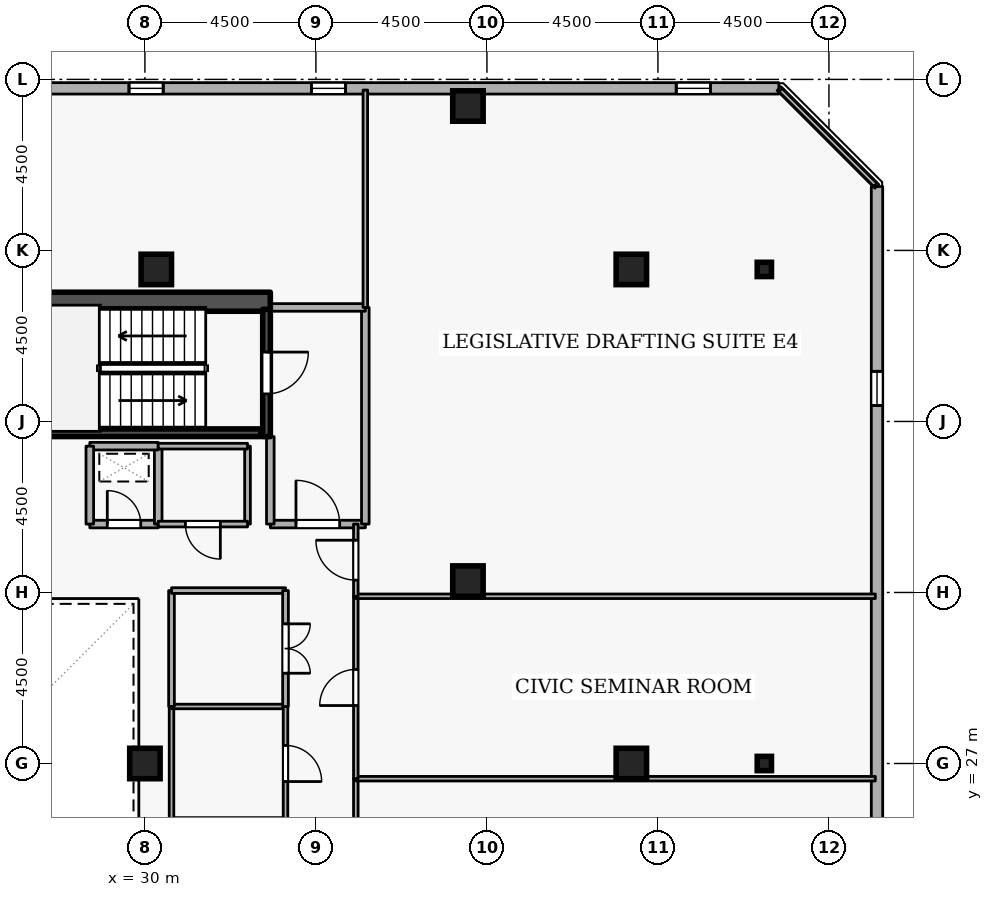
"""IFC4 building model, lengths in metres.
Left out: names, types, materials, properties, quantities, classifications, styles, units other than length and angle.
Written with IfcOpenShell. Run it as: python <this file> out.ifc"""

import sys

from ifc_helpers import new_model, si_unit, direction, frame, frame_2d, origin, origin_2d, place, context, subcontext, project, spatial, rectangle, i_section, extrude, element, fill, save


model = new_model("IFC4")
c1 = context("Model", 3, precision=1e-05, world=origin(), true_north=direction((0.0, 1.0)))
c2 = subcontext(c1, "Body", "Model", "MODEL_VIEW")
j1 = project(units=[si_unit("LENGTHUNIT", "METRE"), si_unit("PLANEANGLEUNIT", "RADIAN")], contexts=[c1])
p1 = place(None, origin())
s1 = spatial("IfcSite", under=j1, at=p1, CompositionType="ELEMENT")
p2 = place(p1, origin())
s2 = spatial("IfcBuilding", under=s1, at=p2, CompositionType="ELEMENT")
p3 = place(p2, frame((0.0, 0.0, 276.3)))
s3 = spatial("IfcBuildingStorey", under=s2, at=p3, CompositionType="ELEMENT", Elevation=276.3)
p4 = place(p3, frame((17.7, 39.15, 0.0), z_axis=(0.0, 0.0, 1.0), x_axis=(1.0, 0.0, 0.0)))
e1 = element("IfcWall", 1, at=p4, inside=s3, PredefinedType="SHEAR", context=c2, shape_type="SweptSolid", body=[
    extrude(rectangle(XDim=15.6, YDim=0.5, at=frame_2d((7.8, 0.0))), origin(), (0.0, 0.0, 1.0), 3.6),
])
for number, where, z_axis, x_axis in (
    (2, (42.8, 27.0, 0.0), (0.0, 0.0, 1.0), (1.0, 0.0, 0.0)),
    (3, (42.8, 40.0, 0.0), (0.0, 0.0, 1.0), (1.0, 0.0, 0.0)),
    (4, (38.5, 44.3, 0.0), (0.0, 0.0, 1.0), (1.0, 0.0, 0.0)),
    (5, (38.5, 31.8, 0.0), (0.0, 0.0, 1.0), (1.0, 0.0, 0.0)),
    (6, (30.3, 40.0, 0.0), (0.0, 0.0, 1.0), (1.0, 0.0, 0.0)),
    (7, (30.0, 27.0, 0.0), (0.0, 0.0, 1.0), (1.0, 0.0, 0.0)),
):
    element("IfcColumn", number, at=place(p3, frame(where, z_axis=z_axis, x_axis=x_axis)), inside=s3, PredefinedType="COLUMN", context=c2, shape_type="SweptSolid", body=[
        extrude(rectangle(XDim=0.8, YDim=0.8, at=origin_2d()), origin(), (0.0, 0.0, 1.0), 3.6),
    ])
for number, where, z_axis, x_axis in (
    (8, (46.3, 27.0, 0.0), (0.0, 0.0, 1.0), (1.0, 0.0, 0.0)),
    (9, (46.3, 40.0, 0.0), (0.0, 0.0, 1.0), (1.0, 0.0, 0.0)),
):
    element("IfcColumn", number, at=place(p3, frame(where, z_axis=z_axis, x_axis=x_axis)), inside=s3, PredefinedType="COLUMN", context=c2, shape_type="SweptSolid", body=[
        extrude(i_section(OverallWidth=0.375, OverallDepth=0.375, WebThickness=0.017, FlangeThickness=0.027, FilletRadius=0.015, at=origin_2d()), origin(), (0.0, 0.0, 1.0), 3.6),
    ])
p5 = place(p3, frame((49.265, 5.819, 0.0), z_axis=(0.0, 0.0, 1.0), x_axis=(0.0, 1.0, 0.0)))
e10 = element("IfcWall", 10, at=p5, inside=s3, PredefinedType="STANDARD", context=c2, shape_type="SweptSolid", body=[
    extrude(rectangle(XDim=36.363, YDim=0.3, at=frame_2d((18.181, 0.0))), origin(), (0.0, 0.0, 1.0), 2.66),
])
p6 = place(p5, frame((1.8, 0.0, 0.72)))
e11 = element("IfcOpeningElement", 11, at=p6, cuts=e10, PredefinedType="OPENING", context=c2, shape_type="SweptSolid", body=[
    extrude(rectangle(XDim=0.9, YDim=1.75, at=frame_2d((0.45, 0.875))), frame((0.0, 0.16, 0.0), z_axis=(0.0, -1.0, 0.0), x_axis=(1.0, 0.0, 0.0)), (0.0, 0.0, 1.0), 0.32),
])
p7 = place(p5, frame((6.6, 0.0, 0.72)))
e12 = element("IfcOpeningElement", 12, at=p7, cuts=e10, PredefinedType="OPENING", context=c2, shape_type="SweptSolid", body=[
    extrude(rectangle(XDim=0.9, YDim=1.75, at=frame_2d((0.45, 0.875))), frame((0.0, 0.16, 0.0), z_axis=(0.0, -1.0, 0.0), x_axis=(1.0, 0.0, 0.0)), (0.0, 0.0, 1.0), 0.32),
])
p8 = place(p5, frame((11.4, 0.0, 0.72)))
e13 = element("IfcOpeningElement", 13, at=p8, cuts=e10, PredefinedType="OPENING", context=c2, shape_type="SweptSolid", body=[
    extrude(rectangle(XDim=0.9, YDim=1.75, at=frame_2d((0.45, 0.875))), frame((0.0, 0.16, 0.0), z_axis=(0.0, -1.0, 0.0), x_axis=(1.0, 0.0, 0.0)), (0.0, 0.0, 1.0), 0.32),
])
p9 = place(p5, frame((16.2, 0.0, 0.72)))
e14 = element("IfcOpeningElement", 14, at=p9, cuts=e10, PredefinedType="OPENING", context=c2, shape_type="SweptSolid", body=[
    extrude(rectangle(XDim=0.9, YDim=1.75, at=frame_2d((0.45, 0.875))), frame((0.0, 0.16, 0.0), z_axis=(0.0, -1.0, 0.0), x_axis=(1.0, 0.0, 0.0)), (0.0, 0.0, 1.0), 0.32),
])
p10 = place(p5, frame((30.6, 0.0, 0.72)))
e15 = element("IfcOpeningElement", 15, at=p10, cuts=e10, PredefinedType="OPENING", context=c2, shape_type="SweptSolid", body=[
    extrude(rectangle(XDim=0.9, YDim=1.75, at=frame_2d((0.45, 0.875))), frame((0.0, 0.16, 0.0), z_axis=(0.0, -1.0, 0.0), x_axis=(1.0, 0.0, 0.0)), (0.0, 0.0, 1.0), 0.32),
])
p11 = place(p3, frame((46.681, 44.765, 0.0), z_axis=(0.0, 0.0, 1.0), x_axis=(-1.0, 0.0, 0.0)))
e16 = element("IfcWall", 16, at=p11, inside=s3, PredefinedType="STANDARD", context=c2, shape_type="SweptSolid", body=[
    extrude(rectangle(XDim=36.363, YDim=0.3, at=frame_2d((18.181, 0.0))), origin(), (0.0, 0.0, 1.0), 2.66),
])
p12 = place(p11, frame((1.8, 0.0, 0.72)))
e17 = element("IfcOpeningElement", 17, at=p12, cuts=e16, PredefinedType="OPENING", context=c2, shape_type="SweptSolid", body=[
    extrude(rectangle(XDim=0.9, YDim=1.75, at=frame_2d((0.45, 0.875))), frame((0.0, 0.16, 0.0), z_axis=(0.0, -1.0, 0.0), x_axis=(1.0, 0.0, 0.0)), (0.0, 0.0, 1.0), 0.32),
])
p13 = place(p11, frame((11.4, 0.0, 0.72)))
e18 = element("IfcOpeningElement", 18, at=p13, cuts=e16, PredefinedType="OPENING", context=c2, shape_type="SweptSolid", body=[
    extrude(rectangle(XDim=0.9, YDim=1.75, at=frame_2d((0.45, 0.875))), frame((0.0, 0.16, 0.0), z_axis=(0.0, -1.0, 0.0), x_axis=(1.0, 0.0, 0.0)), (0.0, 0.0, 1.0), 0.32),
])
p14 = place(p11, frame((16.2, 0.0, 0.72)))
e19 = element("IfcOpeningElement", 19, at=p14, cuts=e16, PredefinedType="OPENING", context=c2, shape_type="SweptSolid", body=[
    extrude(rectangle(XDim=0.9, YDim=1.75, at=frame_2d((0.45, 0.875))), frame((0.0, 0.16, 0.0), z_axis=(0.0, -1.0, 0.0), x_axis=(1.0, 0.0, 0.0)), (0.0, 0.0, 1.0), 0.32),
])
p15 = place(p11, frame((25.8, 0.0, 0.72)))
e20 = element("IfcOpeningElement", 20, at=p15, cuts=e16, PredefinedType="OPENING", context=c2, shape_type="SweptSolid", body=[
    extrude(rectangle(XDim=0.9, YDim=1.75, at=frame_2d((0.45, 0.875))), frame((0.0, 0.16, 0.0), z_axis=(0.0, -1.0, 0.0), x_axis=(1.0, 0.0, 0.0)), (0.0, 0.0, 1.0), 0.32),
])
p16 = place(p3, frame((33.2, 38.95, 0.0), z_axis=(0.0, 0.0, 1.0), x_axis=(0.0, -1.0, 0.0)))
e21 = element("IfcWall", 21, at=p16, inside=s3, PredefinedType="SHEAR", context=c2, shape_type="SweptSolid", body=[
    extrude(rectangle(XDim=3.35, YDim=0.2, at=frame_2d((1.675, 0.0))), origin(), (0.0, 0.0, 1.0), 3.6),
])
p17 = place(p16, frame((1.125, 0.0, 0.0)))
e22 = element("IfcOpeningElement", 22, at=p17, cuts=e21, PredefinedType="OPENING", context=c2, shape_type="SweptSolid", body=[
    extrude(rectangle(XDim=1.1, YDim=2.1, at=frame_2d((0.55, 1.05))), frame((0.0, 0.11, 0.0), z_axis=(0.0, -1.0, 0.0), x_axis=(1.0, 0.0, 0.0)), (0.0, 0.0, 1.0), 0.22),
])
p18 = place(p3, frame((25.95, 35.703, 0.0), z_axis=(0.0, 0.0, 1.0), x_axis=(1.0, 0.0, 0.0)))
e23 = element("IfcWall", 23, at=p18, inside=s3, PredefinedType="SHEAR", context=c2, shape_type="SweptSolid", body=[
    extrude(rectangle(XDim=7.1, YDim=0.2, at=frame_2d((3.55, 0.0))), origin(), (0.0, 0.0, 1.0), 3.6),
])
p19 = place(p3, frame((33.3, 33.3, 0.0), z_axis=(0.0, 0.0, 1.0), x_axis=(1.0, 0.0, 0.0)))
e24 = element("IfcWall", 24, at=p19, inside=s3, PredefinedType="STANDARD", context=c2, shape_type="SweptSolid", body=[
    extrude(rectangle(XDim=2.5, YDim=0.2, at=frame_2d((1.25, 0.0))), origin(), (0.0, 0.0, 1.0), 3.26),
])
p20 = place(p19, frame((0.675, 0.0, 0.0)))
e25 = element("IfcOpeningElement", 25, at=p20, cuts=e24, PredefinedType="OPENING", context=c2, shape_type="SweptSolid", body=[
    extrude(rectangle(XDim=1.15, YDim=2.1, at=frame_2d((0.575, 1.05))), frame((0.0, 0.11, 0.0), z_axis=(0.0, -1.0, 0.0), x_axis=(1.0, 0.0, 0.0)), (0.0, 0.0, 1.0), 0.22),
])
p21 = place(p3, frame((35.8, 33.3, 0.0), z_axis=(0.0, 0.0, 1.0), x_axis=(0.0, 1.0, 0.0)))
e26 = element("IfcWall", 26, at=p21, inside=s3, PredefinedType="STANDARD", context=c2, shape_type="SweptSolid", body=[
    extrude(rectangle(XDim=5.7, YDim=0.2, at=frame_2d((2.85, 0.0))), origin(), (0.0, 0.0, 1.0), 3.26),
])
p22 = place(p3, frame((35.8, 39.0, 0.0), z_axis=(0.0, 0.0, 1.0), x_axis=(-1.0, 0.0, 0.0)))
e27 = element("IfcWall", 27, at=p22, inside=s3, PredefinedType="STANDARD", context=c2, shape_type="SweptSolid", body=[
    extrude(rectangle(XDim=2.5, YDim=0.2, at=frame_2d((1.25, 0.0))), origin(), (0.0, 0.0, 1.0), 3.26),
])
p23 = place(p3, frame((33.3, 35.6, 0.0), z_axis=(0.0, 0.0, 1.0), x_axis=(0.0, -1.0, 0.0)))
e28 = element("IfcWall", 28, at=p23, inside=s3, PredefinedType="STANDARD", context=c2, shape_type="SweptSolid", body=[
    extrude(rectangle(XDim=2.3, YDim=0.2, at=frame_2d((1.15, 0.0))), origin(), (0.0, 0.0, 1.0), 2.465),
])
p24 = place(p3, frame((28.55, 33.3, 0.0), z_axis=(0.0, 0.0, 1.0), x_axis=(1.0, 0.0, 0.0)))
e29 = element("IfcWall", 29, at=p24, inside=s3, PredefinedType="STANDARD", context=c2, shape_type="SweptSolid", body=[
    extrude(rectangle(XDim=1.8, YDim=0.2, at=frame_2d((0.9, 0.0))), origin(), (0.0, 0.0, 1.0), 3.26),
])
p25 = place(p24, frame((0.46, 0.0, 0.0)))
e30 = element("IfcOpeningElement", 30, at=p25, cuts=e29, PredefinedType="OPENING", context=c2, shape_type="SweptSolid", body=[
    extrude(rectangle(XDim=0.88, YDim=2.04, at=frame_2d((0.44, 1.02))), frame((0.0, 0.11, 0.0), z_axis=(0.0, -1.0, 0.0), x_axis=(1.0, 0.0, 0.0)), (0.0, 0.0, 1.0), 0.22),
])
p26 = place(p3, frame((30.35, 33.3, 0.0), z_axis=(0.0, 0.0, 1.0), x_axis=(0.0, 1.0, 0.0)))
e31 = element("IfcWall", 31, at=p26, inside=s3, PredefinedType="STANDARD", context=c2, shape_type="SweptSolid", body=[
    extrude(rectangle(XDim=2.05, YDim=0.2, at=frame_2d((1.025, 0.0))), origin(), (0.0, 0.0, 1.0), 3.26),
])
p27 = place(p3, frame((30.35, 35.35, 0.0), z_axis=(0.0, 0.0, 1.0), x_axis=(-1.0, 0.0, 0.0)))
e32 = element("IfcWall", 32, at=p27, inside=s3, PredefinedType="STANDARD", context=c2, shape_type="SweptSolid", body=[
    extrude(rectangle(XDim=1.8, YDim=0.2, at=frame_2d((0.9, 0.0))), origin(), (0.0, 0.0, 1.0), 3.26),
])
p28 = place(p3, frame((28.55, 35.35, 0.0), z_axis=(0.0, 0.0, 1.0), x_axis=(0.0, -1.0, 0.0)))
e33 = element("IfcWall", 33, at=p28, inside=s3, PredefinedType="STANDARD", context=c2, shape_type="SweptSolid", body=[
    extrude(rectangle(XDim=2.05, YDim=0.2, at=frame_2d((1.025, 0.0))), origin(), (0.0, 0.0, 1.0), 3.26),
])
p29 = place(p3, frame((32.7, 35.35, 0.0), z_axis=(0.0, 0.0, 1.0), x_axis=(0.0, -1.0, 0.0)))
e34 = element("IfcWall", 34, at=p29, inside=s3, PredefinedType="PARTITIONING", context=c2, shape_type="SweptSolid", body=[
    extrude(rectangle(XDim=2.05, YDim=0.15, at=frame_2d((1.025, 0.0))), origin(), (0.0, 0.0, 1.0), 2.465),
])
p30 = place(p3, frame((32.7, 33.3, 0.0), z_axis=(0.0, 0.0, 1.0), x_axis=(-1.0, 0.0, 0.0)))
e35 = element("IfcWall", 35, at=p30, inside=s3, PredefinedType="PARTITIONING", context=c2, shape_type="SweptSolid", body=[
    extrude(rectangle(XDim=2.35, YDim=0.15, at=frame_2d((1.175, 0.0))), origin(), (0.0, 0.0, 1.0), 3.26),
])
p31 = place(p30, frame((0.715, 0.0, 0.0)))
e36 = element("IfcOpeningElement", 36, at=p31, cuts=e35, PredefinedType="OPENING", context=c2, shape_type="SweptSolid", body=[
    extrude(rectangle(XDim=0.92, YDim=2.08, at=frame_2d((0.46, 1.04))), frame((0.0, 0.085, 0.0), z_axis=(0.0, -1.0, 0.0), x_axis=(1.0, 0.0, 0.0)), (0.0, 0.0, 1.0), 0.17),
])
p32 = place(p3, frame((30.35, 35.35, 0.0), z_axis=(0.0, 0.0, 1.0), x_axis=(1.0, 0.0, 0.0)))
e37 = element("IfcWall", 37, at=p32, inside=s3, PredefinedType="PARTITIONING", context=c2, shape_type="SweptSolid", body=[
    extrude(rectangle(XDim=2.35, YDim=0.15, at=frame_2d((1.175, 0.0))), origin(), (0.0, 0.0, 1.0), 3.26),
])
p33 = place(p3, frame((35.55, 21.2, 0.0), z_axis=(0.0, 0.0, 1.0), x_axis=(0.0, 1.0, 0.0)))
e38 = element("IfcWall", 38, at=p33, inside=s3, PredefinedType="PARTITIONING", context=c2, shape_type="SweptSolid", body=[
    extrude(rectangle(XDim=5.4, YDim=0.12, at=frame_2d((2.7, 0.0))), origin(), (0.0, 0.0, 1.0), 3.26),
])
p34 = place(p33, frame((2.225, 0.0, 0.0)))
e39 = element("IfcOpeningElement", 39, at=p34, cuts=e38, PredefinedType="OPENING", context=c2, shape_type="SweptSolid", body=[
    extrude(rectangle(XDim=0.95, YDim=2.1, at=frame_2d((0.475, 1.05))), frame((0.0, 0.07, 0.0), z_axis=(0.0, -1.0, 0.0), x_axis=(1.0, 0.0, 0.0)), (0.0, 0.0, 1.0), 0.14),
])
p35 = place(p3, frame((35.55, 26.6, 0.0), z_axis=(0.0, 0.0, 1.0), x_axis=(1.0, 0.0, 0.0)))
e40 = element("IfcWall", 40, at=p35, inside=s3, PredefinedType="PARTITIONING", context=c2, shape_type="SweptSolid", body=[
    extrude(rectangle(XDim=13.67, YDim=0.12, at=frame_2d((6.835, 0.0))), origin(), (0.0, 0.0, 1.0), 3.26),
])
p36 = place(p3, frame((35.55, 26.6, 0.0), z_axis=(0.0, 0.0, 1.0), x_axis=(0.0, 1.0, 0.0)))
e41 = element("IfcWall", 41, at=p36, inside=s3, PredefinedType="PARTITIONING", context=c2, shape_type="SweptSolid", body=[
    extrude(rectangle(XDim=4.8, YDim=0.12, at=frame_2d((2.4, 0.0))), origin(), (0.0, 0.0, 1.0), 3.26),
])
p37 = place(p36, frame((1.925, 0.0, 0.0)))
e42 = element("IfcOpeningElement", 42, at=p37, cuts=e41, PredefinedType="OPENING", context=c2, shape_type="SweptSolid", body=[
    extrude(rectangle(XDim=0.95, YDim=2.1, at=frame_2d((0.475, 1.05))), frame((0.0, 0.07, 0.0), z_axis=(0.0, -1.0, 0.0), x_axis=(1.0, 0.0, 0.0)), (0.0, 0.0, 1.0), 0.14),
])
p38 = place(p3, frame((35.55, 31.4, 0.0), z_axis=(0.0, 0.0, 1.0), x_axis=(1.0, 0.0, 0.0)))
e43 = element("IfcWall", 43, at=p38, inside=s3, PredefinedType="PARTITIONING", context=c2, shape_type="SweptSolid", body=[
    extrude(rectangle(XDim=13.67, YDim=0.12, at=frame_2d((6.835, 0.0))), origin(), (0.0, 0.0, 1.0), 3.26),
])
p39 = place(p3, frame((35.8, 39.0, 0.0), z_axis=(0.0, 0.0, 1.0), x_axis=(0.0, 1.0, 0.0)))
e44 = element("IfcWall", 44, at=p39, inside=s3, PredefinedType="PARTITIONING", context=c2, shape_type="SweptSolid", body=[
    extrude(rectangle(XDim=5.72, YDim=0.12, at=frame_2d((2.86, 0.0))), origin(), (0.0, 0.0, 1.0), 3.26),
])
p40 = place(p3, frame((46.725, 44.72, 0.0), z_axis=(0.0, 0.0, 1.0), x_axis=(0.707106781187, -0.707106781187, 0.0)))
e45 = element("IfcWall", 45, at=p40, inside=s3, PredefinedType="PARTITIONING", context=c2, shape_type="SweptSolid", body=[
    extrude(rectangle(XDim=3.528, YDim=0.12, at=frame_2d((1.764, 0.0))), origin(), (0.0, 0.0, 1.0), 3.26),
])
p41 = place(p3, frame((35.55, 31.4, 0.0), z_axis=(0.0, 0.0, 1.0), x_axis=(0.0, 1.0, 0.0)))
e46 = element("IfcWall", 46, at=p41, inside=s3, PredefinedType="PARTITIONING", context=c2, shape_type="SweptSolid", body=[
    extrude(rectangle(XDim=1.9, YDim=0.12, at=frame_2d((0.95, 0.0))), origin(), (0.0, 0.0, 1.0), 3.26),
])
p42 = place(p41, frame((0.425, 0.0, 0.0)))
e47 = element("IfcOpeningElement", 47, at=p42, cuts=e46, PredefinedType="OPENING", context=c2, shape_type="SweptSolid", body=[
    extrude(rectangle(XDim=1.05, YDim=2.1, at=frame_2d((0.525, 1.05))), frame((0.0, 0.07, 0.0), z_axis=(0.0, -1.0, 0.0), x_axis=(1.0, 0.0, 0.0)), (0.0, 0.0, 1.0), 0.14),
])
for number, where, z_axis, x_axis in (
    (48, (30.7, 25.5, 0.0), (0.0, 0.0, 1.0), (0.0, 1.0, 0.0)),
    (49, (30.7, 28.5, 0.0), (0.0, 0.0, 1.0), (1.0, 0.0, 0.0)),
):
    element("IfcWall", number, at=place(p3, frame(where, z_axis=z_axis, x_axis=x_axis)), inside=s3, PredefinedType="PARTITIONING", context=c2, shape_type="SweptSolid", body=[
        extrude(rectangle(XDim=3.0, YDim=0.12, at=frame_2d((1.5, 0.0))), origin(), (0.0, 0.0, 1.0), 3.26),
    ])
p43 = place(p3, frame((33.7, 28.5, 0.0), z_axis=(0.0, 0.0, 1.0), x_axis=(0.0, -1.0, 0.0)))
e50 = element("IfcWall", 50, at=p43, inside=s3, PredefinedType="PARTITIONING", context=c2, shape_type="SweptSolid", body=[
    extrude(rectangle(XDim=3.0, YDim=0.12, at=frame_2d((1.5, 0.0))), origin(), (0.0, 0.0, 1.0), 3.26),
])
p44 = place(p43, frame((1.025, 0.0, 0.0)))
e51 = element("IfcOpeningElement", 51, at=p44, cuts=e50, PredefinedType="OPENING", context=c2, shape_type="SweptSolid", body=[
    extrude(rectangle(XDim=0.95, YDim=2.1, at=frame_2d((0.475, 1.05))), frame((0.0, 0.07, 0.0), z_axis=(0.0, -1.0, 0.0), x_axis=(1.0, 0.0, 0.0)), (0.0, 0.0, 1.0), 0.14),
])
p45 = place(p3, frame((30.7, 28.5, 0.0), z_axis=(0.0, 0.0, 1.0), x_axis=(0.0, 1.0, 0.0)))
e52 = element("IfcWall", 52, at=p45, inside=s3, PredefinedType="PARTITIONING", context=c2, shape_type="SweptSolid", body=[
    extrude(rectangle(XDim=3.05, YDim=0.15, at=frame_2d((1.525, 0.0))), origin(), (0.0, 0.0, 1.0), 3.26),
])
p46 = place(p3, frame((30.7, 31.55, 0.0), z_axis=(0.0, 0.0, 1.0), x_axis=(1.0, 0.0, 0.0)))
e53 = element("IfcWall", 53, at=p46, inside=s3, PredefinedType="PARTITIONING", context=c2, shape_type="SweptSolid", body=[
    extrude(rectangle(XDim=3.0, YDim=0.15, at=frame_2d((1.5, 0.0))), origin(), (0.0, 0.0, 1.0), 3.26),
])
p47 = place(p3, frame((33.7, 31.55, 0.0), z_axis=(0.0, 0.0, 1.0), x_axis=(0.0, -1.0, 0.0)))
e54 = element("IfcWall", 54, at=p47, inside=s3, PredefinedType="PARTITIONING", context=c2, shape_type="SweptSolid", body=[
    extrude(rectangle(XDim=3.05, YDim=0.15, at=frame_2d((1.525, 0.0))), origin(), (0.0, 0.0, 1.0), 3.26),
])
p48 = place(p47, frame((0.875, 0.0, 0.0)))
e55 = element("IfcOpeningElement", 55, at=p48, cuts=e54, PredefinedType="OPENING", context=c2, shape_type="SweptSolid", body=[
    extrude(rectangle(XDim=1.3, YDim=2.12, at=frame_2d((0.65, 1.06))), frame((0.0, 0.085, 0.0), z_axis=(0.0, -1.0, 0.0), x_axis=(1.0, 0.0, 0.0)), (0.0, 0.0, 1.0), 0.17),
])
p49 = place(p10, origin())
e56 = element("IfcWindow", 56, at=p49, inside=s3, PartitioningType="SINGLE_PANEL", PredefinedType="WINDOW", context=c2, shape_type="SweptSolid", body=[
    extrude(rectangle(XDim=0.9, YDim=1.75, at=frame_2d((0.45, 0.875))), frame((0.0, 0.03, 0.0), z_axis=(0.0, -1.0, 0.0), x_axis=(1.0, 0.0, 0.0)), (0.0, 0.0, 1.0), 0.06),
])
fill(e15, e56)
p50 = place(p12, origin())
e57 = element("IfcWindow", 57, at=p50, inside=s3, PartitioningType="SINGLE_PANEL", PredefinedType="WINDOW", context=c2, shape_type="SweptSolid", body=[
    extrude(rectangle(XDim=0.9, YDim=1.75, at=frame_2d((0.45, 0.875))), frame((0.0, 0.03, 0.0), z_axis=(0.0, -1.0, 0.0), x_axis=(1.0, 0.0, 0.0)), (0.0, 0.0, 1.0), 0.06),
])
fill(e17, e57)
p51 = place(p13, origin())
e58 = element("IfcWindow", 58, at=p51, inside=s3, PartitioningType="SINGLE_PANEL", PredefinedType="WINDOW", context=c2, shape_type="SweptSolid", body=[
    extrude(rectangle(XDim=0.9, YDim=1.75, at=frame_2d((0.45, 0.875))), frame((0.0, 0.03, 0.0), z_axis=(0.0, -1.0, 0.0), x_axis=(1.0, 0.0, 0.0)), (0.0, 0.0, 1.0), 0.06),
])
fill(e18, e58)
p52 = place(p14, origin())
e59 = element("IfcWindow", 59, at=p52, inside=s3, PartitioningType="SINGLE_PANEL", PredefinedType="WINDOW", context=c2, shape_type="SweptSolid", body=[
    extrude(rectangle(XDim=0.9, YDim=1.75, at=frame_2d((0.45, 0.875))), frame((0.0, 0.03, 0.0), z_axis=(0.0, -1.0, 0.0), x_axis=(1.0, 0.0, 0.0)), (0.0, 0.0, 1.0), 0.06),
])
fill(e19, e59)
p53 = place(p17, origin())
e60 = element("IfcDoor", 60, at=p53, inside=s3, OperationType="SINGLE_SWING_LEFT", PredefinedType="DOOR", context=c2, shape_type="SweptSolid", body=[
    extrude(rectangle(XDim=1.1, YDim=2.1, at=frame_2d((0.55, 1.05))), frame((0.0, 0.025, 0.0), z_axis=(0.0, -1.0, 0.0), x_axis=(1.0, 0.0, 0.0)), (0.0, 0.0, 1.0), 0.05),
])
fill(e22, e60)
p54 = place(p20, origin())
e61 = element("IfcDoor", 61, at=p54, inside=s3, OperationType="SINGLE_SWING_LEFT", PredefinedType="DOOR", context=c2, shape_type="SweptSolid", body=[
    extrude(rectangle(XDim=1.15, YDim=2.1, at=frame_2d((0.575, 1.05))), frame((0.0, 0.025, 0.0), z_axis=(0.0, -1.0, 0.0), x_axis=(1.0, 0.0, 0.0)), (0.0, 0.0, 1.0), 0.05),
])
fill(e25, e61)
p55 = place(p25, origin())
e62 = element("IfcDoor", 62, at=p55, inside=s3, OperationType="SINGLE_SWING_LEFT", PredefinedType="DOOR", context=c2, shape_type="SweptSolid", body=[
    extrude(rectangle(XDim=0.88, YDim=2.04, at=frame_2d((0.44, 1.02))), frame((0.0, 0.025, 0.0), z_axis=(0.0, -1.0, 0.0), x_axis=(1.0, 0.0, 0.0)), (0.0, 0.0, 1.0), 0.05),
])
fill(e30, e62)
p56 = place(p31, origin())
e63 = element("IfcDoor", 63, at=p56, inside=s3, OperationType="SINGLE_SWING_LEFT", PredefinedType="DOOR", context=c2, shape_type="SweptSolid", body=[
    extrude(rectangle(XDim=0.92, YDim=2.08, at=frame_2d((0.46, 1.04))), frame((0.0, 0.025, 0.0), z_axis=(0.0, -1.0, 0.0), x_axis=(1.0, 0.0, 0.0)), (0.0, 0.0, 1.0), 0.05),
])
fill(e36, e63)
p57 = place(p37, origin())
e64 = element("IfcDoor", 64, at=p57, inside=s3, OperationType="SINGLE_SWING_LEFT", PredefinedType="DOOR", context=c2, shape_type="SweptSolid", body=[
    extrude(rectangle(XDim=0.95, YDim=2.1, at=frame_2d((0.475, 1.05))), frame((0.0, 0.025, 0.0), z_axis=(0.0, -1.0, 0.0), x_axis=(1.0, 0.0, 0.0)), (0.0, 0.0, 1.0), 0.05),
])
fill(e42, e64)
p58 = place(p42, origin())
e65 = element("IfcDoor", 65, at=p58, inside=s3, OperationType="SINGLE_SWING_RIGHT", PredefinedType="DOOR", context=c2, shape_type="SweptSolid", body=[
    extrude(rectangle(XDim=1.05, YDim=2.1, at=frame_2d((0.525, 1.05))), frame((0.0, 0.025, 0.0), z_axis=(0.0, -1.0, 0.0), x_axis=(1.0, 0.0, 0.0)), (0.0, 0.0, 1.0), 0.05),
])
fill(e47, e65)
p59 = place(p44, origin())
e66 = element("IfcDoor", 66, at=p59, inside=s3, OperationType="SINGLE_SWING_RIGHT", PredefinedType="DOOR", context=c2, shape_type="SweptSolid", body=[
    extrude(rectangle(XDim=0.95, YDim=2.1, at=frame_2d((0.475, 1.05))), frame((0.0, 0.025, 0.0), z_axis=(0.0, -1.0, 0.0), x_axis=(1.0, 0.0, 0.0)), (0.0, 0.0, 1.0), 0.05),
])
fill(e51, e66)
p60 = place(p48, origin())
e67 = element("IfcDoor", 67, at=p60, inside=s3, OperationType="DOUBLE_DOOR_SINGLE_SWING", PredefinedType="DOOR", context=c2, shape_type="SweptSolid", body=[
    extrude(rectangle(XDim=1.3, YDim=2.12, at=frame_2d((0.65, 1.06))), frame((0.0, 0.025, 0.0), z_axis=(0.0, -1.0, 0.0), x_axis=(1.0, 0.0, 0.0)), (0.0, 0.0, 1.0), 0.05),
])
fill(e55, e67)
save(model, sys.argv[1])
